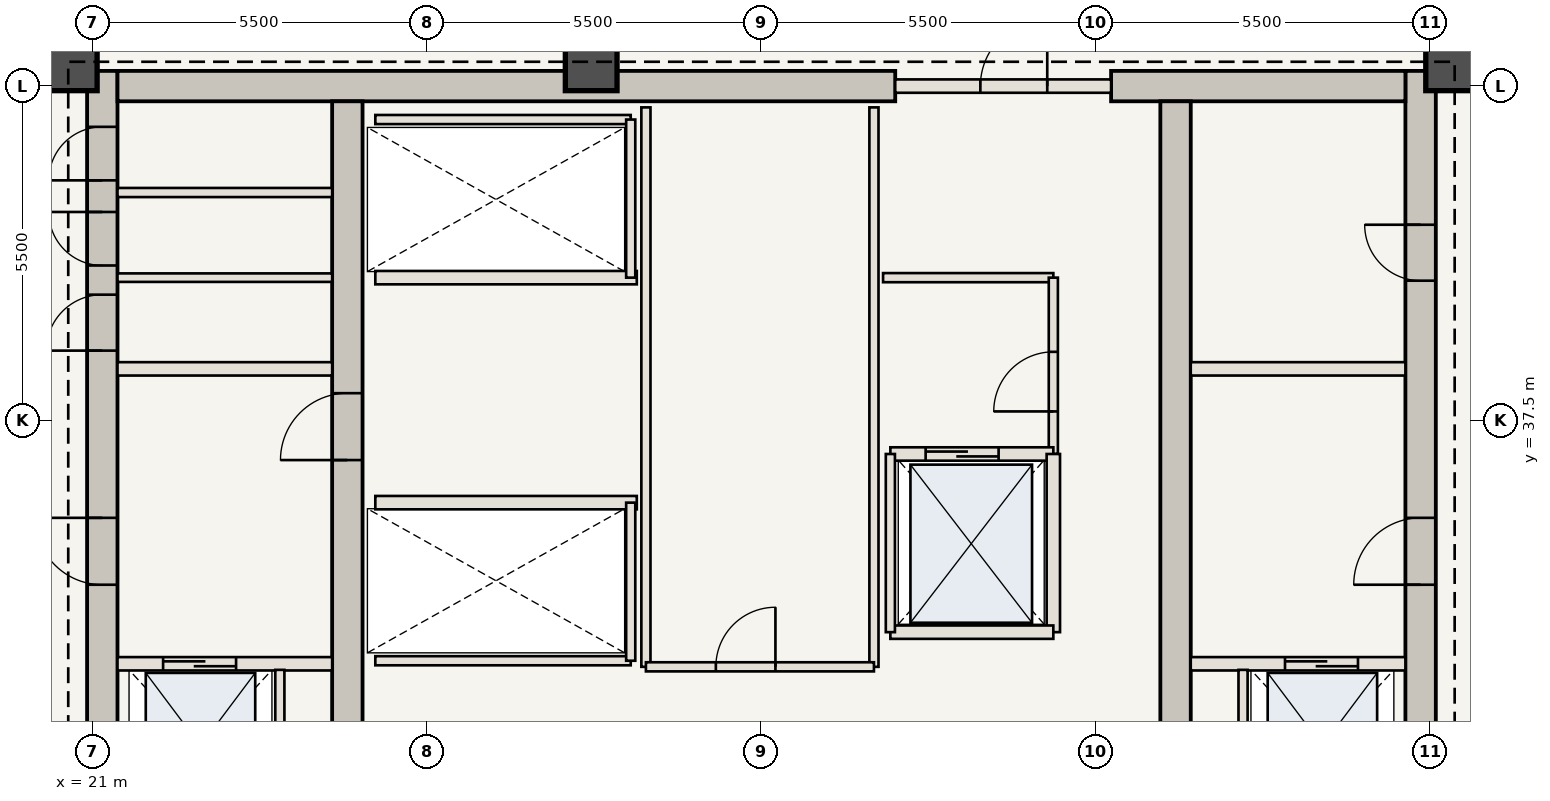
"""IFC4 building model, lengths in metres.
Left out: names, types, materials, properties, quantities, classifications, styles, units other than length and angle.
Written with IfcOpenShell. Run it as: python <this file> out.ifc"""

import sys

from ifc_helpers import new_model, si_unit, direction, frame, frame_2d, origin, origin_2d, place, context, subcontext, project, spatial, rectangle, extrude, element, fill, save


model = new_model("IFC4")
c1 = context("Model", 3, precision=1e-05, world=origin(), true_north=direction((0.0, 1.0)))
c2 = subcontext(c1, "Body", "Model", "MODEL_VIEW")
j1 = project(units=[si_unit("LENGTHUNIT", "METRE"), si_unit("PLANEANGLEUNIT", "RADIAN")], contexts=[c1])
p1 = place(None, origin())
s1 = spatial("IfcSite", under=j1, at=p1, CompositionType="ELEMENT")
p2 = place(p1, origin())
s2 = spatial("IfcBuilding", under=s1, at=p2, CompositionType="ELEMENT")
p3 = place(p2, frame((0.0, 0.0, 194.6)))
s3 = spatial("IfcBuildingStorey", under=s2, at=p3, CompositionType="ELEMENT", Elevation=194.6)
p4 = place(p3, frame((21.16, 30.6, 0.0), z_axis=(0.0, 0.0, 1.0), x_axis=(0.0, 1.0, 0.0)))
e1 = element("IfcWall", 1, at=p4, inside=s3, PredefinedType="SHEAR", context=c2, shape_type="SweptSolid", body=[
    extrude(rectangle(XDim=12.65, YDim=0.5, at=frame_2d((6.325, 0.0))), origin(), (0.0, 0.0, 1.0), 3.85),
])
p5 = place(p4, frame((4.2, 0.0, 0.0)))
e2 = element("IfcOpeningElement", 2, at=p5, cuts=e1, PredefinedType="OPENING", context=c2, shape_type="SweptSolid", body=[
    extrude(rectangle(XDim=1.1, YDim=2.15, at=frame_2d((0.55, 1.075))), frame((0.0, 0.26, 0.0), z_axis=(0.0, -1.0, 0.0), x_axis=(1.0, 0.0, 0.0)), (0.0, 0.0, 1.0), 0.52),
])
p6 = place(p4, frame((8.05, 0.0, 0.0)))
e3 = element("IfcOpeningElement", 3, at=p6, cuts=e1, PredefinedType="OPENING", context=c2, shape_type="SweptSolid", body=[
    extrude(rectangle(XDim=0.92, YDim=2.1, at=frame_2d((0.46, 1.05))), frame((0.0, 0.26, 0.0), z_axis=(0.0, -1.0, 0.0), x_axis=(1.0, 0.0, 0.0)), (0.0, 0.0, 1.0), 0.52),
])
p7 = place(p4, frame((9.45, 0.0, 0.0)))
e4 = element("IfcOpeningElement", 4, at=p7, cuts=e1, PredefinedType="OPENING", context=c2, shape_type="SweptSolid", body=[
    extrude(rectangle(XDim=0.88, YDim=2.1, at=frame_2d((0.44, 1.05))), frame((0.0, 0.26, 0.0), z_axis=(0.0, -1.0, 0.0), x_axis=(1.0, 0.0, 0.0)), (0.0, 0.0, 1.0), 0.52),
])
p8 = place(p4, frame((10.85, 0.0, 0.0)))
e5 = element("IfcOpeningElement", 5, at=p8, cuts=e1, PredefinedType="OPENING", context=c2, shape_type="SweptSolid", body=[
    extrude(rectangle(XDim=0.88, YDim=2.1, at=frame_2d((0.44, 1.05))), frame((0.0, 0.26, 0.0), z_axis=(0.0, -1.0, 0.0), x_axis=(1.0, 0.0, 0.0)), (0.0, 0.0, 1.0), 0.52),
])
p9 = place(p3, frame((42.84, 30.6, 0.0), z_axis=(0.0, 0.0, 1.0), x_axis=(0.0, 1.0, 0.0)))
e6 = element("IfcWall", 6, at=p9, inside=s3, PredefinedType="SHEAR", context=c2, shape_type="SweptSolid", body=[
    extrude(rectangle(XDim=12.65, YDim=0.5, at=frame_2d((6.325, 0.0))), origin(), (0.0, 0.0, 1.0), 3.85),
])
p10 = place(p9, frame((4.2, 0.0, 0.0)))
e7 = element("IfcOpeningElement", 7, at=p10, cuts=e6, PredefinedType="OPENING", context=c2, shape_type="SweptSolid", body=[
    extrude(rectangle(XDim=1.1, YDim=2.15, at=frame_2d((0.55, 1.075))), frame((0.0, 0.26, 0.0), z_axis=(0.0, -1.0, 0.0), x_axis=(1.0, 0.0, 0.0)), (0.0, 0.0, 1.0), 0.52),
])
p11 = place(p9, frame((9.2, 0.0, 0.0)))
e8 = element("IfcOpeningElement", 8, at=p11, cuts=e6, PredefinedType="OPENING", context=c2, shape_type="SweptSolid", body=[
    extrude(rectangle(XDim=0.92, YDim=2.1, at=frame_2d((0.46, 1.05))), frame((0.0, 0.26, 0.0), z_axis=(0.0, -1.0, 0.0), x_axis=(1.0, 0.0, 0.0)), (0.0, 0.0, 1.0), 0.52),
])
p12 = place(p3, frame((21.41, 43.0, 0.0), z_axis=(0.0, 0.0, 1.0), x_axis=(1.0, 0.0, 0.0)))
e9 = element("IfcWall", 9, at=p12, inside=s3, PredefinedType="SHEAR", context=c2, shape_type="SweptSolid", body=[
    extrude(rectangle(XDim=12.79, YDim=0.5, at=frame_2d((6.395, 0.0))), origin(), (0.0, 0.0, 1.0), 3.85),
])
p13 = place(p3, frame((37.75, 43.0, 0.0), z_axis=(0.0, 0.0, 1.0), x_axis=(1.0, 0.0, 0.0)))
e10 = element("IfcWall", 10, at=p13, inside=s3, PredefinedType="SHEAR", context=c2, shape_type="SweptSolid", body=[
    extrude(rectangle(XDim=4.84, YDim=0.5, at=frame_2d((2.42, 0.0))), origin(), (0.0, 0.0, 1.0), 3.85),
])
p14 = place(p3, frame((25.19, 30.6, 0.0), z_axis=(0.0, 0.0, 1.0), x_axis=(0.0, 1.0, 0.0)))
e11 = element("IfcWall", 11, at=p14, inside=s3, PredefinedType="SHEAR", context=c2, shape_type="SweptSolid", body=[
    extrude(rectangle(XDim=12.15, YDim=0.5, at=frame_2d((6.075, 0.0))), origin(), (0.0, 0.0, 1.0), 3.85),
])
p15 = place(p14, frame((6.25, 0.0, 0.0)))
e12 = element("IfcOpeningElement", 12, at=p15, cuts=e11, PredefinedType="OPENING", context=c2, shape_type="SweptSolid", body=[
    extrude(rectangle(XDim=1.1, YDim=2.15, at=frame_2d((0.55, 1.075))), frame((0.0, 0.26, 0.0), z_axis=(0.0, -1.0, 0.0), x_axis=(1.0, 0.0, 0.0)), (0.0, 0.0, 1.0), 0.52),
])
p16 = place(p3, frame((38.81, 30.6, 0.0), z_axis=(0.0, 0.0, 1.0), x_axis=(0.0, 1.0, 0.0)))
e13 = element("IfcWall", 13, at=p16, inside=s3, PredefinedType="SHEAR", context=c2, shape_type="SweptSolid", body=[
    extrude(rectangle(XDim=12.15, YDim=0.5, at=frame_2d((6.075, 0.0))), origin(), (0.0, 0.0, 1.0), 3.85),
])
for number, where, z_axis, x_axis in (
    (14, (43.35, 43.35, 0.0), (0.0, 0.0, 1.0), (1.0, 0.0, 0.0)),
    (15, (29.2, 43.35, 0.0), (0.0, 0.0, 1.0), (1.0, 0.0, 0.0)),
    (16, (20.65, 43.35, 0.0), (0.0, 0.0, 1.0), (1.0, 0.0, 0.0)),
):
    element("IfcColumn", number, at=place(p3, frame(where, z_axis=z_axis, x_axis=x_axis)), inside=s3, PredefinedType="COLUMN", context=c2, shape_type="SweptSolid", body=[
        extrude(rectangle(XDim=0.85, YDim=0.85, at=origin_2d()), origin(), (0.0, 0.0, 1.0), 3.85),
    ])
p17 = place(p3, frame((21.41, 33.5, 0.0), z_axis=(0.0, 0.0, 1.0), x_axis=(1.0, 0.0, 0.0)))
e17 = element("IfcWall", 17, at=p17, inside=s3, PredefinedType="STANDARD", context=c2, shape_type="SweptSolid", body=[
    extrude(rectangle(XDim=3.53, YDim=0.22, at=frame_2d((1.765, 0.0))), origin(), (0.0, 0.0, 1.0), 3.685),
])
p18 = place(p17, frame((0.75, 0.0, 0.0)))
e18 = element("IfcOpeningElement", 18, at=p18, cuts=e17, PredefinedType="OPENING", context=c2, shape_type="SweptSolid", body=[
    extrude(rectangle(XDim=1.2, YDim=2.2, at=frame_2d((0.6, 1.1))), frame((0.0, 0.12, 0.0), z_axis=(0.0, -1.0, 0.0), x_axis=(1.0, 0.0, 0.0)), (0.0, 0.0, 1.0), 0.24),
])
p19 = place(p3, frame((24.08, 30.75, 0.0), z_axis=(0.0, 0.0, 1.0), x_axis=(0.0, 1.0, 0.0)))
e19 = element("IfcWall", 19, at=p19, inside=s3, PredefinedType="STANDARD", context=c2, shape_type="SweptSolid", body=[
    extrude(rectangle(XDim=2.65, YDim=0.15, at=frame_2d((1.325, 0.0))), origin(), (0.0, 0.0, 1.0), 3.685),
])
p20 = place(p3, frame((39.06, 33.5, 0.0), z_axis=(0.0, 0.0, 1.0), x_axis=(1.0, 0.0, 0.0)))
e20 = element("IfcWall", 20, at=p20, inside=s3, PredefinedType="STANDARD", context=c2, shape_type="SweptSolid", body=[
    extrude(rectangle(XDim=3.53, YDim=0.22, at=frame_2d((1.765, 0.0))), origin(), (0.0, 0.0, 1.0), 3.685),
])
p21 = place(p20, frame((1.55, 0.0, 0.0)))
e21 = element("IfcOpeningElement", 21, at=p21, cuts=e20, PredefinedType="OPENING", context=c2, shape_type="SweptSolid", body=[
    extrude(rectangle(XDim=1.2, YDim=2.2, at=frame_2d((0.6, 1.1))), frame((0.0, 0.12, 0.0), z_axis=(0.0, -1.0, 0.0), x_axis=(1.0, 0.0, 0.0)), (0.0, 0.0, 1.0), 0.24),
])
p22 = place(p3, frame((39.92, 30.75, 0.0), z_axis=(0.0, 0.0, 1.0), x_axis=(0.0, 1.0, 0.0)))
e22 = element("IfcWall", 22, at=p22, inside=s3, PredefinedType="STANDARD", context=c2, shape_type="SweptSolid", body=[
    extrude(rectangle(XDim=2.65, YDim=0.15, at=frame_2d((1.325, 0.0))), origin(), (0.0, 0.0, 1.0), 3.685),
])
for number, where, z_axis, x_axis in (
    (23, (21.41, 38.35, 0.0), (0.0, 0.0, 1.0), (1.0, 0.0, 0.0)),
    (24, (39.06, 38.35, 0.0), (0.0, 0.0, 1.0), (1.0, 0.0, 0.0)),
):
    element("IfcWall", number, at=place(p3, frame(where, z_axis=z_axis, x_axis=x_axis)), inside=s3, PredefinedType="STANDARD", context=c2, shape_type="SweptSolid", body=[
        extrude(rectangle(XDim=3.53, YDim=0.22, at=frame_2d((1.765, 0.0))), origin(), (0.0, 0.0, 1.0), 3.685),
    ])
p23 = place(p3, frame((21.41, 39.85, 0.0), z_axis=(0.0, 0.0, 1.0), x_axis=(1.0, 0.0, 0.0)))
e25 = element("IfcWall", 25, at=p23, inside=s3, PredefinedType="STANDARD", context=c2, shape_type="SweptSolid", body=[
    extrude(rectangle(XDim=3.53, YDim=0.14, at=frame_2d((1.765, 0.0))), origin(), (0.0, 0.0, 1.0), 3.685),
])
p24 = place(p3, frame((21.41, 41.25, 0.0), z_axis=(0.0, 0.0, 1.0), x_axis=(1.0, 0.0, 0.0)))
e26 = element("IfcWall", 26, at=p24, inside=s3, PredefinedType="STANDARD", context=c2, shape_type="SweptSolid", body=[
    extrude(rectangle(XDim=3.53, YDim=0.15, at=frame_2d((1.765, 0.0))), origin(), (0.0, 0.0, 1.0), 3.685),
])
p25 = place(p3, frame((34.0, 39.85, 0.0), z_axis=(0.0, 0.0, 1.0), x_axis=(1.0, 0.0, 0.0)))
e27 = element("IfcWall", 27, at=p25, inside=s3, PredefinedType="STANDARD", context=c2, shape_type="SweptSolid", body=[
    extrude(rectangle(XDim=2.8, YDim=0.15, at=frame_2d((1.4, 0.0))), origin(), (0.0, 0.0, 1.0), 3.685),
])
p26 = place(p3, frame((36.8, 36.95, 0.0), z_axis=(0.0, 0.0, 1.0), x_axis=(0.0, 1.0, 0.0)))
e28 = element("IfcWall", 28, at=p26, inside=s3, PredefinedType="STANDARD", context=c2, shape_type="SweptSolid", body=[
    extrude(rectangle(XDim=2.9, YDim=0.15, at=frame_2d((1.45, 0.0))), origin(), (0.0, 0.0, 1.0), 3.685),
])
p27 = place(p26, frame((0.7, 0.0, 0.0)))
e29 = element("IfcOpeningElement", 29, at=p27, cuts=e28, PredefinedType="OPENING", context=c2, shape_type="SweptSolid", body=[
    extrude(rectangle(XDim=0.98, YDim=2.2, at=frame_2d((0.49, 1.1))), frame((0.0, 0.085, 0.0), z_axis=(0.0, -1.0, 0.0), x_axis=(1.0, 0.0, 0.0)), (0.0, 0.0, 1.0), 0.17),
])
p28 = place(p3, frame((25.65, 36.15, 0.0), z_axis=(0.0, 0.0, 1.0), x_axis=(1.0, 0.0, 0.0)))
e30 = element("IfcWall", 30, at=p28, inside=s3, PredefinedType="STANDARD", context=c2, shape_type="SweptSolid", body=[
    extrude(rectangle(XDim=4.3, YDim=0.22, at=frame_2d((2.15, 0.0))), origin(), (0.0, 0.0, 1.0), 3.685),
])
p29 = place(p3, frame((25.65, 33.55, 0.0), z_axis=(0.0, 0.0, 1.0), x_axis=(1.0, 0.0, 0.0)))
e31 = element("IfcWall", 31, at=p29, inside=s3, PredefinedType="STANDARD", context=c2, shape_type="SweptSolid", body=[
    extrude(rectangle(XDim=4.2, YDim=0.15, at=frame_2d((2.1, 0.0))), origin(), (0.0, 0.0, 1.0), 3.685),
])
p30 = place(p3, frame((29.85, 33.55, 0.0), z_axis=(0.0, 0.0, 1.0), x_axis=(0.0, 1.0, 0.0)))
e32 = element("IfcWall", 32, at=p30, inside=s3, PredefinedType="STANDARD", context=c2, shape_type="SweptSolid", body=[
    extrude(rectangle(XDim=2.6, YDim=0.15, at=frame_2d((1.3, 0.0))), origin(), (0.0, 0.0, 1.0), 3.685),
])
p31 = place(p3, frame((25.65, 39.85, 0.0), z_axis=(0.0, 0.0, 1.0), x_axis=(1.0, 0.0, 0.0)))
e33 = element("IfcWall", 33, at=p31, inside=s3, PredefinedType="STANDARD", context=c2, shape_type="SweptSolid", body=[
    extrude(rectangle(XDim=4.3, YDim=0.22, at=frame_2d((2.15, 0.0))), origin(), (0.0, 0.0, 1.0), 3.685),
])
p32 = place(p3, frame((25.65, 42.45, 0.0), z_axis=(0.0, 0.0, 1.0), x_axis=(1.0, 0.0, 0.0)))
e34 = element("IfcWall", 34, at=p32, inside=s3, PredefinedType="STANDARD", context=c2, shape_type="SweptSolid", body=[
    extrude(rectangle(XDim=4.2, YDim=0.15, at=frame_2d((2.1, 0.0))), origin(), (0.0, 0.0, 1.0), 3.685),
])
p33 = place(p3, frame((29.85, 39.85, 0.0), z_axis=(0.0, 0.0, 1.0), x_axis=(0.0, 1.0, 0.0)))
e35 = element("IfcWall", 35, at=p33, inside=s3, PredefinedType="STANDARD", context=c2, shape_type="SweptSolid", body=[
    extrude(rectangle(XDim=2.6, YDim=0.15, at=frame_2d((1.3, 0.0))), origin(), (0.0, 0.0, 1.0), 3.685),
])
for number, where, z_axis, x_axis in (
    (36, (30.1, 33.45, 0.0), (0.0, 0.0, 1.0), (0.0, 1.0, 0.0)),
    (37, (33.85, 33.45, 0.0), (0.0, 0.0, 1.0), (0.0, 1.0, 0.0)),
):
    element("IfcWall", number, at=place(p3, frame(where, z_axis=z_axis, x_axis=x_axis)), inside=s3, PredefinedType="STANDARD", context=c2, shape_type="SweptSolid", body=[
        extrude(rectangle(XDim=9.2, YDim=0.15, at=frame_2d((4.6, 0.0))), origin(), (0.0, 0.0, 1.0), 3.685),
    ])
p34 = place(p3, frame((30.1, 33.45, 0.0), z_axis=(0.0, 0.0, 1.0), x_axis=(1.0, 0.0, 0.0)))
e38 = element("IfcWall", 38, at=p34, inside=s3, PredefinedType="STANDARD", context=c2, shape_type="SweptSolid", body=[
    extrude(rectangle(XDim=3.75, YDim=0.15, at=frame_2d((1.875, 0.0))), origin(), (0.0, 0.0, 1.0), 3.685),
])
p35 = place(p34, frame((1.15, 0.0, 0.0)))
e39 = element("IfcOpeningElement", 39, at=p35, cuts=e38, PredefinedType="OPENING", context=c2, shape_type="SweptSolid", body=[
    extrude(rectangle(XDim=0.98, YDim=2.2, at=frame_2d((0.49, 1.1))), frame((0.0, 0.085, 0.0), z_axis=(0.0, -1.0, 0.0), x_axis=(1.0, 0.0, 0.0)), (0.0, 0.0, 1.0), 0.17),
])
p36 = place(p3, frame((34.2, 43.0, 0.0), z_axis=(0.0, 0.0, 1.0), x_axis=(1.0, 0.0, 0.0)))
e40 = element("IfcWall", 40, at=p36, inside=s3, PredefinedType="STANDARD", context=c2, shape_type="SweptSolid", body=[
    extrude(rectangle(XDim=3.55, YDim=0.22, at=frame_2d((1.775, 0.0))), origin(), (0.0, 0.0, 1.0), 3.685),
])
p37 = place(p36, frame((1.4, 0.0, 0.0)))
e41 = element("IfcOpeningElement", 41, at=p37, cuts=e40, PredefinedType="OPENING", context=c2, shape_type="SweptSolid", body=[
    extrude(rectangle(XDim=1.1, YDim=2.15, at=frame_2d((0.55, 1.075))), frame((0.0, 0.12, 0.0), z_axis=(0.0, -1.0, 0.0), x_axis=(1.0, 0.0, 0.0)), (0.0, 0.0, 1.0), 0.24),
])
p38 = place(p3, frame((34.12, 36.95, 0.0), z_axis=(0.0, 0.0, 1.0), x_axis=(1.0, 0.0, 0.0)))
e42 = element("IfcWall", 42, at=p38, inside=s3, PredefinedType="STANDARD", context=c2, shape_type="SweptSolid", body=[
    extrude(rectangle(XDim=2.68, YDim=0.22, at=frame_2d((1.34, 0.0))), origin(), (0.0, 0.0, 1.0), 3.685),
])
p39 = place(p38, frame((0.58, 0.0, 0.0)))
e43 = element("IfcOpeningElement", 43, at=p39, cuts=e42, PredefinedType="OPENING", context=c2, shape_type="SweptSolid", body=[
    extrude(rectangle(XDim=1.2, YDim=2.2, at=frame_2d((0.6, 1.1))), frame((0.0, 0.12, 0.0), z_axis=(0.0, -1.0, 0.0), x_axis=(1.0, 0.0, 0.0)), (0.0, 0.0, 1.0), 0.24),
])
p40 = place(p3, frame((36.8, 34.02, 0.0), z_axis=(0.0, 0.0, 1.0), x_axis=(0.0, 1.0, 0.0)))
e44 = element("IfcWall", 44, at=p40, inside=s3, PredefinedType="STANDARD", context=c2, shape_type="SweptSolid", body=[
    extrude(rectangle(XDim=2.93, YDim=0.22, at=frame_2d((1.465, 0.0))), origin(), (0.0, 0.0, 1.0), 3.685),
])
p41 = place(p3, frame((34.12, 34.02, 0.0), z_axis=(0.0, 0.0, 1.0), x_axis=(1.0, 0.0, 0.0)))
e45 = element("IfcWall", 45, at=p41, inside=s3, PredefinedType="STANDARD", context=c2, shape_type="SweptSolid", body=[
    extrude(rectangle(XDim=2.68, YDim=0.22, at=frame_2d((1.34, 0.0))), origin(), (0.0, 0.0, 1.0), 3.685),
])
p42 = place(p3, frame((34.12, 34.02, 0.0), z_axis=(0.0, 0.0, 1.0), x_axis=(0.0, 1.0, 0.0)))
e46 = element("IfcWall", 46, at=p42, inside=s3, PredefinedType="STANDARD", context=c2, shape_type="SweptSolid", body=[
    extrude(rectangle(XDim=2.93, YDim=0.15, at=frame_2d((1.465, 0.0))), origin(), (0.0, 0.0, 1.0), 3.685),
])
p43 = place(p5, origin())
e47 = element("IfcDoor", 47, at=p43, inside=s3, OperationType="SINGLE_SWING_RIGHT", PredefinedType="DOOR", context=c2, shape_type="SweptSolid", body=[
    extrude(rectangle(XDim=1.1, YDim=2.15, at=frame_2d((0.55, 1.075))), frame((0.0, 0.025, 0.0), z_axis=(0.0, -1.0, 0.0), x_axis=(1.0, 0.0, 0.0)), (0.0, 0.0, 1.0), 0.05),
])
fill(e2, e47)
p44 = place(p10, origin())
e48 = element("IfcDoor", 48, at=p44, inside=s3, OperationType="SINGLE_SWING_LEFT", PredefinedType="DOOR", context=c2, shape_type="SweptSolid", body=[
    extrude(rectangle(XDim=1.1, YDim=2.15, at=frame_2d((0.55, 1.075))), frame((0.0, 0.025, 0.0), z_axis=(0.0, -1.0, 0.0), x_axis=(1.0, 0.0, 0.0)), (0.0, 0.0, 1.0), 0.05),
])
fill(e7, e48)
p45 = place(p15, origin())
e49 = element("IfcDoor", 49, at=p45, inside=s3, OperationType="SINGLE_SWING_LEFT", PredefinedType="DOOR", context=c2, shape_type="SweptSolid", body=[
    extrude(rectangle(XDim=1.1, YDim=2.15, at=frame_2d((0.55, 1.075))), frame((0.0, 0.025, 0.0), z_axis=(0.0, -1.0, 0.0), x_axis=(1.0, 0.0, 0.0)), (0.0, 0.0, 1.0), 0.05),
])
fill(e12, e49)
p46 = place(p6, origin())
e50 = element("IfcDoor", 50, at=p46, inside=s3, OperationType="SINGLE_SWING_LEFT", PredefinedType="DOOR", context=c2, shape_type="SweptSolid", body=[
    extrude(rectangle(XDim=0.92, YDim=2.1, at=frame_2d((0.46, 1.05))), frame((0.0, 0.025, 0.0), z_axis=(0.0, -1.0, 0.0), x_axis=(1.0, 0.0, 0.0)), (0.0, 0.0, 1.0), 0.05),
])
fill(e3, e50)
p47 = place(p7, origin())
e51 = element("IfcDoor", 51, at=p47, inside=s3, OperationType="SINGLE_SWING_RIGHT", PredefinedType="DOOR", context=c2, shape_type="SweptSolid", body=[
    extrude(rectangle(XDim=0.88, YDim=2.1, at=frame_2d((0.44, 1.05))), frame((0.0, 0.025, 0.0), z_axis=(0.0, -1.0, 0.0), x_axis=(1.0, 0.0, 0.0)), (0.0, 0.0, 1.0), 0.05),
])
fill(e4, e51)
p48 = place(p8, origin())
e52 = element("IfcDoor", 52, at=p48, inside=s3, OperationType="SINGLE_SWING_LEFT", PredefinedType="DOOR", context=c2, shape_type="SweptSolid", body=[
    extrude(rectangle(XDim=0.88, YDim=2.1, at=frame_2d((0.44, 1.05))), frame((0.0, 0.025, 0.0), z_axis=(0.0, -1.0, 0.0), x_axis=(1.0, 0.0, 0.0)), (0.0, 0.0, 1.0), 0.05),
])
fill(e5, e52)
p49 = place(p11, origin())
e53 = element("IfcDoor", 53, at=p49, inside=s3, OperationType="SINGLE_SWING_RIGHT", PredefinedType="DOOR", context=c2, shape_type="SweptSolid", body=[
    extrude(rectangle(XDim=0.92, YDim=2.1, at=frame_2d((0.46, 1.05))), frame((0.0, 0.025, 0.0), z_axis=(0.0, -1.0, 0.0), x_axis=(1.0, 0.0, 0.0)), (0.0, 0.0, 1.0), 0.05),
])
fill(e8, e53)
p50 = place(p18, origin())
e54 = element("IfcDoor", 54, at=p50, inside=s3, OperationType="DOUBLE_DOOR_SLIDING", PredefinedType="DOOR", context=c2, shape_type="SweptSolid", body=[
    extrude(rectangle(XDim=1.2, YDim=2.2, at=frame_2d((0.6, 1.1))), frame((0.0, 0.025, 0.0), z_axis=(0.0, -1.0, 0.0), x_axis=(1.0, 0.0, 0.0)), (0.0, 0.0, 1.0), 0.05),
])
fill(e18, e54)
p51 = place(p21, origin())
e55 = element("IfcDoor", 55, at=p51, inside=s3, OperationType="DOUBLE_DOOR_SLIDING", PredefinedType="DOOR", context=c2, shape_type="SweptSolid", body=[
    extrude(rectangle(XDim=1.2, YDim=2.2, at=frame_2d((0.6, 1.1))), frame((0.0, 0.025, 0.0), z_axis=(0.0, -1.0, 0.0), x_axis=(1.0, 0.0, 0.0)), (0.0, 0.0, 1.0), 0.05),
])
fill(e21, e55)
p52 = place(p27, origin())
e56 = element("IfcDoor", 56, at=p52, inside=s3, OperationType="SINGLE_SWING_LEFT", PredefinedType="DOOR", context=c2, shape_type="SweptSolid", body=[
    extrude(rectangle(XDim=0.98, YDim=2.2, at=frame_2d((0.49, 1.1))), frame((0.0, 0.025, 0.0), z_axis=(0.0, -1.0, 0.0), x_axis=(1.0, 0.0, 0.0)), (0.0, 0.0, 1.0), 0.05),
])
fill(e29, e56)
p53 = place(p35, origin())
e57 = element("IfcDoor", 57, at=p53, inside=s3, OperationType="SINGLE_SWING_RIGHT", PredefinedType="DOOR", context=c2, shape_type="SweptSolid", body=[
    extrude(rectangle(XDim=0.98, YDim=2.2, at=frame_2d((0.49, 1.1))), frame((0.0, 0.025, 0.0), z_axis=(0.0, -1.0, 0.0), x_axis=(1.0, 0.0, 0.0)), (0.0, 0.0, 1.0), 0.05),
])
fill(e39, e57)
p54 = place(p37, origin())
e58 = element("IfcDoor", 58, at=p54, inside=s3, OperationType="SINGLE_SWING_RIGHT", PredefinedType="DOOR", context=c2, shape_type="SweptSolid", body=[
    extrude(rectangle(XDim=1.1, YDim=2.15, at=frame_2d((0.55, 1.075))), frame((0.0, 0.025, 0.0), z_axis=(0.0, -1.0, 0.0), x_axis=(1.0, 0.0, 0.0)), (0.0, 0.0, 1.0), 0.05),
])
fill(e41, e58)
p55 = place(p39, origin())
e59 = element("IfcDoor", 59, at=p55, inside=s3, OperationType="DOUBLE_DOOR_SLIDING", PredefinedType="DOOR", context=c2, shape_type="SweptSolid", body=[
    extrude(rectangle(XDim=1.2, YDim=2.2, at=frame_2d((0.6, 1.1))), frame((0.0, 0.025, 0.0), z_axis=(0.0, -1.0, 0.0), x_axis=(1.0, 0.0, 0.0)), (0.0, 0.0, 1.0), 0.05),
])
fill(e43, e59)
save(model, sys.argv[1])
